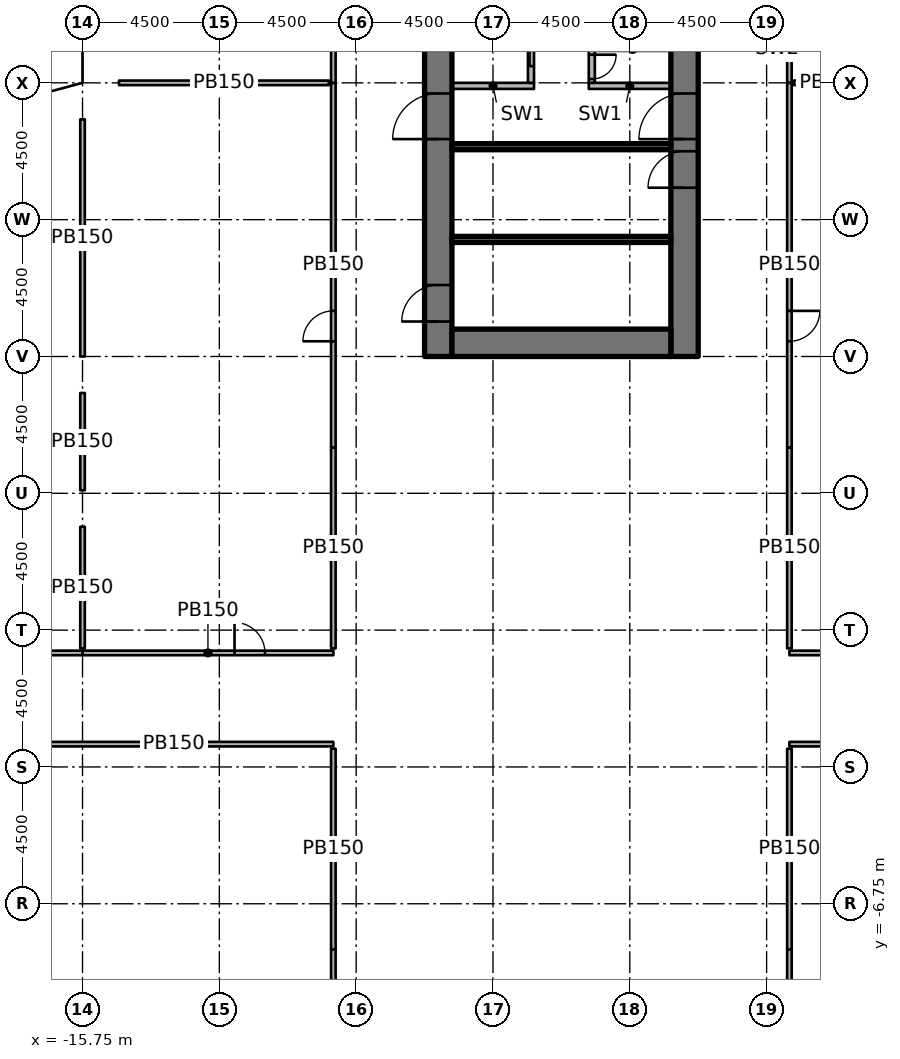
"""IFC4 building model, lengths in metres.
Left out: names, types, materials, properties, quantities, classifications, styles, units other than length and angle.
Written with IfcOpenShell. Run it as: python <this file> out.ifc"""

import sys

from ifc_helpers import new_model, si_unit, direction, frame, frame_2d, origin, origin_2d, place, context, subcontext, project, spatial, rectangle, extrude, element, fill, save


model = new_model("IFC4")
c1 = context("Model", 3, precision=1e-05, world=origin(), true_north=direction((0.0, 1.0)))
c2 = subcontext(c1, "Body", "Model", "MODEL_VIEW")
j1 = project(units=[si_unit("LENGTHUNIT", "METRE"), si_unit("PLANEANGLEUNIT", "RADIAN")], contexts=[c1])
p1 = place(None, origin())
s1 = spatial("IfcSite", under=j1, at=p1, CompositionType="ELEMENT")
p2 = place(p1, origin())
s2 = spatial("IfcBuilding", under=s1, at=p2, CompositionType="ELEMENT")
p3 = place(p2, frame((0.0, 0.0, 17.0)))
s3 = spatial("IfcBuildingStorey", under=s2, at=p3, CompositionType="ELEMENT", Elevation=17.0)
for number, where, z_axis, x_axis in (
    (1, (-15.75, -6.25, 0.0), (0.0, 0.0, 1.0), (1.0, 0.0, 0.0)),
    (2, (-15.75, 6.25, 0.0), (0.0, 0.0, 1.0), (1.0, 0.0, 0.0)),
    (3, (-15.15, 10.65, 0.0), (0.0, 0.0, 1.0), (1.0, 0.0, 0.0)),
    (4, (-15.15, 19.65, 0.0), (0.0, 0.0, 1.0), (1.0, 0.0, 0.0)),
    (5, (-10.75, -6.25, 0.0), (0.0, 0.0, 1.0), (1.0, 0.0, 0.0)),
    (6, (-10.75, 6.25, 0.0), (0.0, 0.0, 1.0), (1.0, 0.0, 0.0)),
    (7, (-10.65, 15.15, 0.0), (0.0, 0.0, 1.0), (1.0, 0.0, 0.0)),
    (8, (-6.25, -6.25, 0.0), (0.0, 0.0, 1.0), (1.0, 0.0, 0.0)),
    (9, (-6.25, 6.25, 0.0), (0.0, 0.0, 1.0), (1.0, 0.0, 0.0)),
    (10, (-6.25, 10.75, 0.0), (0.0, 0.0, 1.0), (1.0, 0.0, 0.0)),
    (11, (-6.25, 15.75, 0.0), (0.0, 0.0, 1.0), (1.0, 0.0, 0.0)),
    (12, (-6.25, 20.25, 0.0), (0.0, 0.0, 1.0), (1.0, 0.0, 0.0)),
    (13, (6.25, -6.25, 0.0), (0.0, 0.0, 1.0), (1.0, 0.0, 0.0)),
    (14, (6.25, 6.25, 0.0), (0.0, 0.0, 1.0), (1.0, 0.0, 0.0)),
    (15, (6.25, 10.75, 0.0), (0.0, 0.0, 1.0), (1.0, 0.0, 0.0)),
    (16, (6.25, 15.75, 0.0), (0.0, 0.0, 1.0), (1.0, 0.0, 0.0)),
    (17, (6.25, 20.25, 0.0), (0.0, 0.0, 1.0), (1.0, 0.0, 0.0)),
):
    element("IfcColumn", number, at=place(p3, frame(where, z_axis=z_axis, x_axis=x_axis)), inside=s3, PredefinedType="COLUMN", context=c2, shape_type="SweptSolid", body=[
        extrude(rectangle(XDim=1.2, YDim=1.2, at=origin_2d()), origin(), (0.0, 0.0, 1.0), 4.55),
    ])
p4 = place(p3, frame((-4.05, 11.25, 0.0), z_axis=(0.0, 0.0, 1.0), x_axis=(0.0, 1.0, 0.0)))
e18 = element("IfcWall", 18, at=p4, inside=s3, PredefinedType="SHEAR", context=c2, shape_type="SweptSolid", body=[
    extrude(rectangle(XDim=15.0, YDim=0.9, at=frame_2d((7.5, 0.0))), origin(), (0.0, 0.0, 1.0), 5.0),
])
p5 = place(p4, frame((7.15, 0.0, 0.0)))
e19 = element("IfcOpeningElement", 19, at=p5, cuts=e18, PredefinedType="OPENING", context=c2, shape_type="SweptSolid", body=[
    extrude(rectangle(XDim=1.5, YDim=2.3, at=frame_2d((0.75, 1.15))), frame((0.0, 0.46, 0.0), z_axis=(0.0, -1.0, 0.0), x_axis=(1.0, 0.0, 0.0)), (0.0, 0.0, 1.0), 0.92),
])
p6 = place(p4, frame((13.9, 0.0, 0.0)))
e20 = element("IfcOpeningElement", 20, at=p6, cuts=e18, PredefinedType="OPENING", context=c2, shape_type="SweptSolid", body=[
    extrude(rectangle(XDim=0.9, YDim=2.1, at=frame_2d((0.45, 1.05))), frame((0.0, 0.46, 0.0), z_axis=(0.0, -1.0, 0.0), x_axis=(1.0, 0.0, 0.0)), (0.0, 0.0, 1.0), 0.92),
])
p7 = place(p4, frame((1.15, 0.0, 0.0)))
e21 = element("IfcOpeningElement", 21, at=p7, cuts=e18, PredefinedType="OPENING", context=c2, shape_type="SweptSolid", body=[
    extrude(rectangle(XDim=1.2, YDim=2.1, at=frame_2d((0.6, 1.05))), frame((0.0, 0.46, 0.0), z_axis=(0.0, -1.0, 0.0), x_axis=(1.0, 0.0, 0.0)), (0.0, 0.0, 1.0), 0.92),
])
p8 = place(p3, frame((4.05, 11.25, 0.0), z_axis=(0.0, 0.0, 1.0), x_axis=(0.0, 1.0, 0.0)))
e22 = element("IfcWall", 22, at=p8, inside=s3, PredefinedType="SHEAR", context=c2, shape_type="SweptSolid", body=[
    extrude(rectangle(XDim=15.0, YDim=0.9, at=frame_2d((7.5, 0.0))), origin(), (0.0, 0.0, 1.0), 5.0),
])
p9 = place(p8, frame((7.15, 0.0, 0.0)))
e23 = element("IfcOpeningElement", 23, at=p9, cuts=e22, PredefinedType="OPENING", context=c2, shape_type="SweptSolid", body=[
    extrude(rectangle(XDim=1.5, YDim=2.3, at=frame_2d((0.75, 1.15))), frame((0.0, 0.46, 0.0), z_axis=(0.0, -1.0, 0.0), x_axis=(1.0, 0.0, 0.0)), (0.0, 0.0, 1.0), 0.92),
])
p10 = place(p8, frame((5.55, 0.0, 0.0)))
e24 = element("IfcOpeningElement", 24, at=p10, cuts=e22, PredefinedType="OPENING", context=c2, shape_type="SweptSolid", body=[
    extrude(rectangle(XDim=1.2, YDim=2.1, at=frame_2d((0.6, 1.05))), frame((0.0, 0.46, 0.0), z_axis=(0.0, -1.0, 0.0), x_axis=(1.0, 0.0, 0.0)), (0.0, 0.0, 1.0), 0.92),
])
p11 = place(p3, frame((-3.6, 11.7, 0.0), z_axis=(0.0, 0.0, 1.0), x_axis=(1.0, 0.0, 0.0)))
e25 = element("IfcWall", 25, at=p11, inside=s3, PredefinedType="SHEAR", context=c2, shape_type="SweptSolid", body=[
    extrude(rectangle(XDim=7.2, YDim=0.9, at=frame_2d((3.6, 0.0))), origin(), (0.0, 0.0, 1.0), 5.0),
])
for number, where, z_axis, x_axis in (
    (26, (-3.6, 18.15, 0.0), (0.0, 0.0, 1.0), (1.0, 0.0, 0.0)),
    (27, (-3.6, 15.1, 0.0), (0.0, 0.0, 1.0), (1.0, 0.0, 0.0)),
):
    element("IfcWall", number, at=place(p3, frame(where, z_axis=z_axis, x_axis=x_axis)), inside=s3, PredefinedType="SHEAR", context=c2, shape_type="SweptSolid", body=[
        extrude(rectangle(XDim=7.2, YDim=0.2, at=frame_2d((3.6, 0.0))), origin(), (0.0, 0.0, 1.0), 4.55),
    ])
p12 = place(p3, frame((-3.6, 20.15, 0.0), z_axis=(0.0, 0.0, 1.0), x_axis=(1.0, 0.0, 0.0)))
e28 = element("IfcWall", 28, at=p12, inside=s3, PredefinedType="PARTITIONING", context=c2, shape_type="SweptSolid", body=[
    extrude(rectangle(XDim=2.7, YDim=0.2, at=frame_2d((1.35, 0.0))), origin(), (0.0, 0.0, 1.0), 4.55),
])
p13 = place(p3, frame((-1.0, 24.85, 0.0), z_axis=(0.0, 0.0, 1.0), x_axis=(0.0, -1.0, 0.0)))
e29 = element("IfcWall", 29, at=p13, inside=s3, PredefinedType="PARTITIONING", context=c2, shape_type="SweptSolid", body=[
    extrude(rectangle(XDim=4.6, YDim=0.2, at=frame_2d((2.3, 0.0))), origin(), (0.0, 0.0, 1.0), 4.55),
])
p14 = place(p13, frame((0.55, 0.0, 0.0)))
e30 = element("IfcOpeningElement", 30, at=p14, cuts=e29, PredefinedType="OPENING", context=c2, shape_type="SweptSolid", body=[
    extrude(rectangle(XDim=1.1, YDim=2.3, at=frame_2d((0.55, 1.15))), frame((0.0, 0.11, 0.0), z_axis=(0.0, -1.0, 0.0), x_axis=(1.0, 0.0, 0.0)), (0.0, 0.0, 1.0), 0.22),
])
p15 = place(p13, frame((2.95, 0.0, 0.0)))
e31 = element("IfcOpeningElement", 31, at=p15, cuts=e29, PredefinedType="OPENING", context=c2, shape_type="SweptSolid", body=[
    extrude(rectangle(XDim=1.1, YDim=2.3, at=frame_2d((0.55, 1.15))), frame((0.0, 0.11, 0.0), z_axis=(0.0, -1.0, 0.0), x_axis=(1.0, 0.0, 0.0)), (0.0, 0.0, 1.0), 0.22),
])
p16 = place(p3, frame((0.9, 20.15, 0.0), z_axis=(0.0, 0.0, 1.0), x_axis=(1.0, 0.0, 0.0)))
e32 = element("IfcWall", 32, at=p16, inside=s3, PredefinedType="PARTITIONING", context=c2, shape_type="SweptSolid", body=[
    extrude(rectangle(XDim=2.7, YDim=0.2, at=frame_2d((1.35, 0.0))), origin(), (0.0, 0.0, 1.0), 4.55),
])
p17 = place(p3, frame((1.0, 24.85, 0.0), z_axis=(0.0, 0.0, 1.0), x_axis=(0.0, -1.0, 0.0)))
e33 = element("IfcWall", 33, at=p17, inside=s3, PredefinedType="PARTITIONING", context=c2, shape_type="SweptSolid", body=[
    extrude(rectangle(XDim=4.6, YDim=0.2, at=frame_2d((2.3, 0.0))), origin(), (0.0, 0.0, 1.0), 4.55),
])
p18 = place(p17, frame((0.55, 0.0, 0.0)))
e34 = element("IfcOpeningElement", 34, at=p18, cuts=e33, PredefinedType="OPENING", context=c2, shape_type="SweptSolid", body=[
    extrude(rectangle(XDim=1.1, YDim=2.3, at=frame_2d((0.55, 1.15))), frame((0.0, 0.11, 0.0), z_axis=(0.0, -1.0, 0.0), x_axis=(1.0, 0.0, 0.0)), (0.0, 0.0, 1.0), 0.22),
])
p19 = place(p17, frame((2.525, 0.0, 0.0)))
e35 = element("IfcOpeningElement", 35, at=p19, cuts=e33, PredefinedType="OPENING", context=c2, shape_type="SweptSolid", body=[
    extrude(rectangle(XDim=0.8, YDim=2.1, at=frame_2d((0.4, 1.05))), frame((0.0, 0.11, 0.0), z_axis=(0.0, -1.0, 0.0), x_axis=(1.0, 0.0, 0.0)), (0.0, 0.0, 1.0), 0.22),
])
p20 = place(p17, frame((3.675, 0.0, 0.0)))
e36 = element("IfcOpeningElement", 36, at=p20, cuts=e33, PredefinedType="OPENING", context=c2, shape_type="SweptSolid", body=[
    extrude(rectangle(XDim=0.8, YDim=2.1, at=frame_2d((0.4, 1.05))), frame((0.0, 0.11, 0.0), z_axis=(0.0, -1.0, 0.0), x_axis=(1.0, 0.0, 0.0)), (0.0, 0.0, 1.0), 0.22),
])
p21 = place(p3, frame((7.5, 20.25, 0.0), z_axis=(0.0, 0.0, 1.0), x_axis=(0.0, -1.0, 0.0)))
e37 = element("IfcWall", 37, at=p21, inside=s3, PredefinedType="PARTITIONING", context=c2, shape_type="SweptSolid", body=[
    extrude(rectangle(XDim=12.0, YDim=0.15, at=frame_2d((6.0, 0.0))), origin(), (0.0, 0.0, 1.0), 4.55),
])
p22 = place(p21, frame((7.5, 0.0, 0.0)))
e38 = element("IfcOpeningElement", 38, at=p22, cuts=e37, PredefinedType="OPENING", context=c2, shape_type="SweptSolid", body=[
    extrude(rectangle(XDim=1.0, YDim=2.1, at=frame_2d((0.5, 1.05))), frame((0.0, 0.085, 0.0), z_axis=(0.0, -1.0, 0.0), x_axis=(1.0, 0.0, 0.0)), (0.0, 0.0, 1.0), 0.17),
])
p23 = place(p3, frame((7.5, 30.0, 0.0), z_axis=(0.0, 0.0, 1.0), x_axis=(0.0, -1.0, 0.0)))
e39 = element("IfcWall", 39, at=p23, inside=s3, PredefinedType="PARTITIONING", context=c2, shape_type="SweptSolid", body=[
    extrude(rectangle(XDim=9.75, YDim=0.15, at=frame_2d((4.875, 0.0))), origin(), (0.0, 0.0, 1.0), 4.55),
])
p24 = place(p23, frame((6.0, 0.0, 0.0)))
e40 = element("IfcOpeningElement", 40, at=p24, cuts=e39, PredefinedType="OPENING", context=c2, shape_type="SweptSolid", body=[
    extrude(rectangle(XDim=0.9, YDim=2.1, at=frame_2d((0.45, 1.05))), frame((0.0, 0.085, 0.0), z_axis=(0.0, -1.0, 0.0), x_axis=(1.0, 0.0, 0.0)), (0.0, 0.0, 1.0), 0.17),
])
p25 = place(p3, frame((-7.5, 8.25, 0.0), z_axis=(0.0, 0.0, 1.0), x_axis=(0.0, 1.0, 0.0)))
e41 = element("IfcWall", 41, at=p25, inside=s3, PredefinedType="PARTITIONING", context=c2, shape_type="SweptSolid", body=[
    extrude(rectangle(XDim=12.0, YDim=0.15, at=frame_2d((6.0, 0.0))), origin(), (0.0, 0.0, 1.0), 4.55),
])
p26 = place(p25, frame((3.5, 0.0, 0.0)))
e42 = element("IfcOpeningElement", 42, at=p26, cuts=e41, PredefinedType="OPENING", context=c2, shape_type="SweptSolid", body=[
    extrude(rectangle(XDim=1.0, YDim=2.1, at=frame_2d((0.5, 1.05))), frame((0.0, 0.085, 0.0), z_axis=(0.0, -1.0, 0.0), x_axis=(1.0, 0.0, 0.0)), (0.0, 0.0, 1.0), 0.17),
])
p27 = place(p3, frame((-7.5, 20.25, 0.0), z_axis=(0.0, 0.0, 1.0), x_axis=(0.0, 1.0, 0.0)))
e43 = element("IfcWall", 43, at=p27, inside=s3, PredefinedType="PARTITIONING", context=c2, shape_type="SweptSolid", body=[
    extrude(rectangle(XDim=9.75, YDim=0.15, at=frame_2d((4.875, 0.0))), origin(), (0.0, 0.0, 1.0), 4.55),
])
p28 = place(p27, frame((2.75, 0.0, 0.0)))
e44 = element("IfcOpeningElement", 44, at=p28, cuts=e43, PredefinedType="OPENING", context=c2, shape_type="SweptSolid", body=[
    extrude(rectangle(XDim=0.9, YDim=2.1, at=frame_2d((0.45, 1.05))), frame((0.0, 0.085, 0.0), z_axis=(0.0, -1.0, 0.0), x_axis=(1.0, 0.0, 0.0)), (0.0, 0.0, 1.0), 0.17),
])
p29 = place(p3, frame((7.5, -8.25, 0.0), z_axis=(0.0, 0.0, 1.0), x_axis=(0.0, -1.0, 0.0)))
e45 = element("IfcWall", 45, at=p29, inside=s3, PredefinedType="PARTITIONING", context=c2, shape_type="SweptSolid", body=[
    extrude(rectangle(XDim=12.0, YDim=0.15, at=frame_2d((6.0, 0.0))), origin(), (0.0, 0.0, 1.0), 4.55),
])
p30 = place(p3, frame((-7.5, -20.25, 0.0), z_axis=(0.0, 0.0, 1.0), x_axis=(0.0, 1.0, 0.0)))
e46 = element("IfcWall", 46, at=p30, inside=s3, PredefinedType="PARTITIONING", context=c2, shape_type="SweptSolid", body=[
    extrude(rectangle(XDim=12.0, YDim=0.15, at=frame_2d((6.0, 0.0))), origin(), (0.0, 0.0, 1.0), 4.55),
])
p31 = place(p30, frame((5.5, 0.0, 0.0)))
e47 = element("IfcOpeningElement", 47, at=p31, cuts=e46, PredefinedType="OPENING", context=c2, shape_type="SweptSolid", body=[
    extrude(rectangle(XDim=1.0, YDim=2.1, at=frame_2d((0.5, 1.05))), frame((0.0, 0.085, 0.0), z_axis=(0.0, -1.0, 0.0), x_axis=(1.0, 0.0, 0.0)), (0.0, 0.0, 1.0), 0.17),
])
p32 = place(p3, frame((7.5, 1.5, 0.0), z_axis=(0.0, 0.0, 1.0), x_axis=(1.0, 0.0, 0.0)))
e48 = element("IfcWall", 48, at=p32, inside=s3, PredefinedType="PARTITIONING", context=c2, shape_type="SweptSolid", body=[
    extrude(rectangle(XDim=12.75, YDim=0.15, at=frame_2d((6.375, 0.0))), origin(), (0.0, 0.0, 1.0), 4.55),
])
p33 = place(p32, frame((3.75, 0.0, 0.0)))
e49 = element("IfcOpeningElement", 49, at=p33, cuts=e48, PredefinedType="OPENING", context=c2, shape_type="SweptSolid", body=[
    extrude(rectangle(XDim=1.0, YDim=2.1, at=frame_2d((0.5, 1.05))), frame((0.0, 0.085, 0.0), z_axis=(0.0, -1.0, 0.0), x_axis=(1.0, 0.0, 0.0)), (0.0, 0.0, 1.0), 0.17),
])
p34 = place(p3, frame((24.75, -1.5, 0.0), z_axis=(0.0, 0.0, 1.0), x_axis=(-1.0, 0.0, 0.0)))
e50 = element("IfcWall", 50, at=p34, inside=s3, PredefinedType="PARTITIONING", context=c2, shape_type="SweptSolid", body=[
    extrude(rectangle(XDim=17.25, YDim=0.15, at=frame_2d((8.625, 0.0))), origin(), (0.0, 0.0, 1.0), 4.55),
])
p35 = place(p34, frame((8.125, 0.0, 0.0)))
e51 = element("IfcOpeningElement", 51, at=p35, cuts=e50, PredefinedType="OPENING", context=c2, shape_type="SweptSolid", body=[
    extrude(rectangle(XDim=1.0, YDim=2.1, at=frame_2d((0.5, 1.05))), frame((0.0, 0.085, 0.0), z_axis=(0.0, -1.0, 0.0), x_axis=(1.0, 0.0, 0.0)), (0.0, 0.0, 1.0), 0.17),
])
p36 = place(p3, frame((-15.75, 1.5, 0.0), z_axis=(0.0, 0.0, 1.0), x_axis=(1.0, 0.0, 0.0)))
e52 = element("IfcWall", 52, at=p36, inside=s3, PredefinedType="PARTITIONING", context=c2, shape_type="SweptSolid", body=[
    extrude(rectangle(XDim=8.25, YDim=0.15, at=frame_2d((4.125, 0.0))), origin(), (0.0, 0.0, 1.0), 4.55),
])
p37 = place(p36, frame((5.0, 0.0, 0.0)))
e53 = element("IfcOpeningElement", 53, at=p37, cuts=e52, PredefinedType="OPENING", context=c2, shape_type="SweptSolid", body=[
    extrude(rectangle(XDim=1.0, YDim=2.1, at=frame_2d((0.5, 1.05))), frame((0.0, 0.085, 0.0), z_axis=(0.0, -1.0, 0.0), x_axis=(1.0, 0.0, 0.0)), (0.0, 0.0, 1.0), 0.17),
])
p38 = place(p3, frame((-42.15, 1.5, 0.0), z_axis=(0.0, 0.0, 1.0), x_axis=(1.0, 0.0, 0.0)))
e54 = element("IfcWall", 54, at=p38, inside=s3, PredefinedType="PARTITIONING", context=c2, shape_type="SweptSolid", body=[
    extrude(rectangle(XDim=26.4, YDim=0.15, at=frame_2d((13.2, 0.0))), origin(), (0.0, 0.0, 1.0), 4.55),
])
p39 = place(p38, frame((12.4, 0.0, 0.0)))
e55 = element("IfcOpeningElement", 55, at=p39, cuts=e54, PredefinedType="OPENING", context=c2, shape_type="SweptSolid", body=[
    extrude(rectangle(XDim=1.0, YDim=2.1, at=frame_2d((0.5, 1.05))), frame((0.0, 0.085, 0.0), z_axis=(0.0, -1.0, 0.0), x_axis=(1.0, 0.0, 0.0)), (0.0, 0.0, 1.0), 0.17),
])
p40 = place(p3, frame((-7.5, -1.5, 0.0), z_axis=(0.0, 0.0, 1.0), x_axis=(-1.0, 0.0, 0.0)))
e56 = element("IfcWall", 56, at=p40, inside=s3, PredefinedType="PARTITIONING", context=c2, shape_type="SweptSolid", body=[
    extrude(rectangle(XDim=10.5, YDim=0.15, at=frame_2d((5.25, 0.0))), origin(), (0.0, 0.0, 1.0), 4.55),
])
p41 = place(p3, frame((7.65, 20.25, 0.0), z_axis=(0.0, 0.0, 1.0), x_axis=(1.0, 0.0, 0.0)))
e57 = element("IfcWall", 57, at=p41, inside=s3, PredefinedType="PARTITIONING", context=c2, shape_type="SweptSolid", body=[
    extrude(rectangle(XDim=2.4, YDim=0.15, at=frame_2d((1.2, 0.0))), origin(), (0.0, 0.0, 1.0), 4.55),
])
p42 = place(p3, frame((7.5, 1.65, 0.0), z_axis=(0.0, 0.0, 1.0), x_axis=(0.0, 1.0, 0.0)))
e58 = element("IfcWall", 58, at=p42, inside=s3, PredefinedType="PARTITIONING", context=c2, shape_type="SweptSolid", body=[
    extrude(rectangle(XDim=6.6, YDim=0.15, at=frame_2d((3.3, 0.0))), origin(), (0.0, 0.0, 1.0), 4.55),
])
p43 = place(p3, frame((-15.75, 1.65, 0.0), z_axis=(0.0, 0.0, 1.0), x_axis=(0.0, 1.0, 0.0)))
e59 = element("IfcWall", 59, at=p43, inside=s3, PredefinedType="PARTITIONING", context=c2, shape_type="SweptSolid", body=[
    extrude(rectangle(XDim=4.0, YDim=0.15, at=frame_2d((2.0, 0.0))), origin(), (0.0, 0.0, 1.0), 4.55),
])
p44 = place(p3, frame((-15.75, 6.85, 0.0), z_axis=(0.0, 0.0, 1.0), x_axis=(0.0, 1.0, 0.0)))
e60 = element("IfcWall", 60, at=p44, inside=s3, PredefinedType="PARTITIONING", context=c2, shape_type="SweptSolid", body=[
    extrude(rectangle(XDim=3.2, YDim=0.15, at=frame_2d((1.6, 0.0))), origin(), (0.0, 0.0, 1.0), 4.55),
])
p45 = place(p3, frame((-15.75, 11.25, 0.0), z_axis=(0.0, 0.0, 1.0), x_axis=(0.0, 1.0, 0.0)))
e61 = element("IfcWall", 61, at=p45, inside=s3, PredefinedType="PARTITIONING", context=c2, shape_type="SweptSolid", body=[
    extrude(rectangle(XDim=7.8, YDim=0.15, at=frame_2d((3.9, 0.0))), origin(), (0.0, 0.0, 1.0), 4.55),
])
p46 = place(p3, frame((-14.55, 20.25, 0.0), z_axis=(0.0, 0.0, 1.0), x_axis=(1.0, 0.0, 0.0)))
e62 = element("IfcWall", 62, at=p46, inside=s3, PredefinedType="PARTITIONING", context=c2, shape_type="SweptSolid", body=[
    extrude(rectangle(XDim=6.9, YDim=0.15, at=frame_2d((3.45, 0.0))), origin(), (0.0, 0.0, 1.0), 4.55),
])
for number, where, z_axis, x_axis in (
    (63, (-7.5, 8.25, 0.0), (0.0, 0.0, 1.0), (0.0, -1.0, 0.0)),
    (64, (7.5, -8.25, 0.0), (0.0, 0.0, 1.0), (0.0, 1.0, 0.0)),
    (65, (-7.5, -1.65, 0.0), (0.0, 0.0, 1.0), (0.0, -1.0, 0.0)),
):
    element("IfcWall", number, at=place(p3, frame(where, z_axis=z_axis, x_axis=x_axis)), inside=s3, PredefinedType="PARTITIONING", context=c2, shape_type="SweptSolid", body=[
        extrude(rectangle(XDim=6.6, YDim=0.15, at=frame_2d((3.3, 0.0))), origin(), (0.0, 0.0, 1.0), 4.55),
    ])
p47 = place(p5, origin())
e66 = element("IfcDoor", 66, at=p47, inside=s3, OperationType="DOUBLE_DOOR_SINGLE_SWING", PredefinedType="DOOR", context=c2, shape_type="SweptSolid", body=[
    extrude(rectangle(XDim=1.5, YDim=2.3, at=frame_2d((0.75, 1.15))), frame((0.0, 0.025, 0.0), z_axis=(0.0, -1.0, 0.0), x_axis=(1.0, 0.0, 0.0)), (0.0, 0.0, 1.0), 0.05),
])
fill(e19, e66)
p48 = place(p9, origin())
e67 = element("IfcDoor", 67, at=p48, inside=s3, OperationType="DOUBLE_DOOR_SINGLE_SWING", PredefinedType="DOOR", context=c2, shape_type="SweptSolid", body=[
    extrude(rectangle(XDim=1.5, YDim=2.3, at=frame_2d((0.75, 1.15))), frame((0.0, 0.025, 0.0), z_axis=(0.0, -1.0, 0.0), x_axis=(1.0, 0.0, 0.0)), (0.0, 0.0, 1.0), 0.05),
])
fill(e23, e67)
p49 = place(p10, origin())
e68 = element("IfcDoor", 68, at=p49, inside=s3, OperationType="SINGLE_SWING_LEFT", PredefinedType="DOOR", context=c2, shape_type="SweptSolid", body=[
    extrude(rectangle(XDim=1.2, YDim=2.1, at=frame_2d((0.6, 1.05))), frame((0.0, 0.025, 0.0), z_axis=(0.0, -1.0, 0.0), x_axis=(1.0, 0.0, 0.0)), (0.0, 0.0, 1.0), 0.05),
])
fill(e24, e68)
p50 = place(p7, origin())
e69 = element("IfcDoor", 69, at=p50, inside=s3, OperationType="SINGLE_SWING_RIGHT", PredefinedType="DOOR", context=c2, shape_type="SweptSolid", body=[
    extrude(rectangle(XDim=1.2, YDim=2.1, at=frame_2d((0.6, 1.05))), frame((0.0, 0.025, 0.0), z_axis=(0.0, -1.0, 0.0), x_axis=(1.0, 0.0, 0.0)), (0.0, 0.0, 1.0), 0.05),
])
fill(e21, e69)
p51 = place(p15, origin())
e70 = element("IfcDoor", 70, at=p51, inside=s3, OperationType="DOUBLE_DOOR_SLIDING", PredefinedType="DOOR", context=c2, shape_type="SweptSolid", body=[
    extrude(rectangle(XDim=1.1, YDim=2.3, at=frame_2d((0.55, 1.15))), frame((0.0, 0.025, 0.0), z_axis=(0.0, -1.0, 0.0), x_axis=(1.0, 0.0, 0.0)), (0.0, 0.0, 1.0), 0.05),
])
fill(e31, e70)
p52 = place(p20, origin())
e71 = element("IfcDoor", 71, at=p52, inside=s3, OperationType="SINGLE_SWING_RIGHT", PredefinedType="DOOR", context=c2, shape_type="SweptSolid", body=[
    extrude(rectangle(XDim=0.8, YDim=2.1, at=frame_2d((0.4, 1.05))), frame((0.0, 0.025, 0.0), z_axis=(0.0, -1.0, 0.0), x_axis=(1.0, 0.0, 0.0)), (0.0, 0.0, 1.0), 0.05),
])
fill(e36, e71)
p53 = place(p22, origin())
e72 = element("IfcDoor", 72, at=p53, inside=s3, OperationType="SINGLE_SWING_LEFT", PredefinedType="DOOR", context=c2, shape_type="SweptSolid", body=[
    extrude(rectangle(XDim=1.0, YDim=2.1, at=frame_2d((0.5, 1.05))), frame((0.0, 0.025, 0.0), z_axis=(0.0, -1.0, 0.0), x_axis=(1.0, 0.0, 0.0)), (0.0, 0.0, 1.0), 0.05),
])
fill(e38, e72)
p54 = place(p26, origin())
e73 = element("IfcDoor", 73, at=p54, inside=s3, OperationType="SINGLE_SWING_LEFT", PredefinedType="DOOR", context=c2, shape_type="SweptSolid", body=[
    extrude(rectangle(XDim=1.0, YDim=2.1, at=frame_2d((0.5, 1.05))), frame((0.0, 0.025, 0.0), z_axis=(0.0, -1.0, 0.0), x_axis=(1.0, 0.0, 0.0)), (0.0, 0.0, 1.0), 0.05),
])
fill(e42, e73)
p55 = place(p37, origin())
e74 = element("IfcDoor", 74, at=p55, inside=s3, OperationType="SINGLE_SWING_LEFT", PredefinedType="DOOR", context=c2, shape_type="SweptSolid", body=[
    extrude(rectangle(XDim=1.0, YDim=2.1, at=frame_2d((0.5, 1.05))), frame((0.0, 0.025, 0.0), z_axis=(0.0, -1.0, 0.0), x_axis=(1.0, 0.0, 0.0)), (0.0, 0.0, 1.0), 0.05),
])
fill(e53, e74)
save(model, sys.argv[1])
